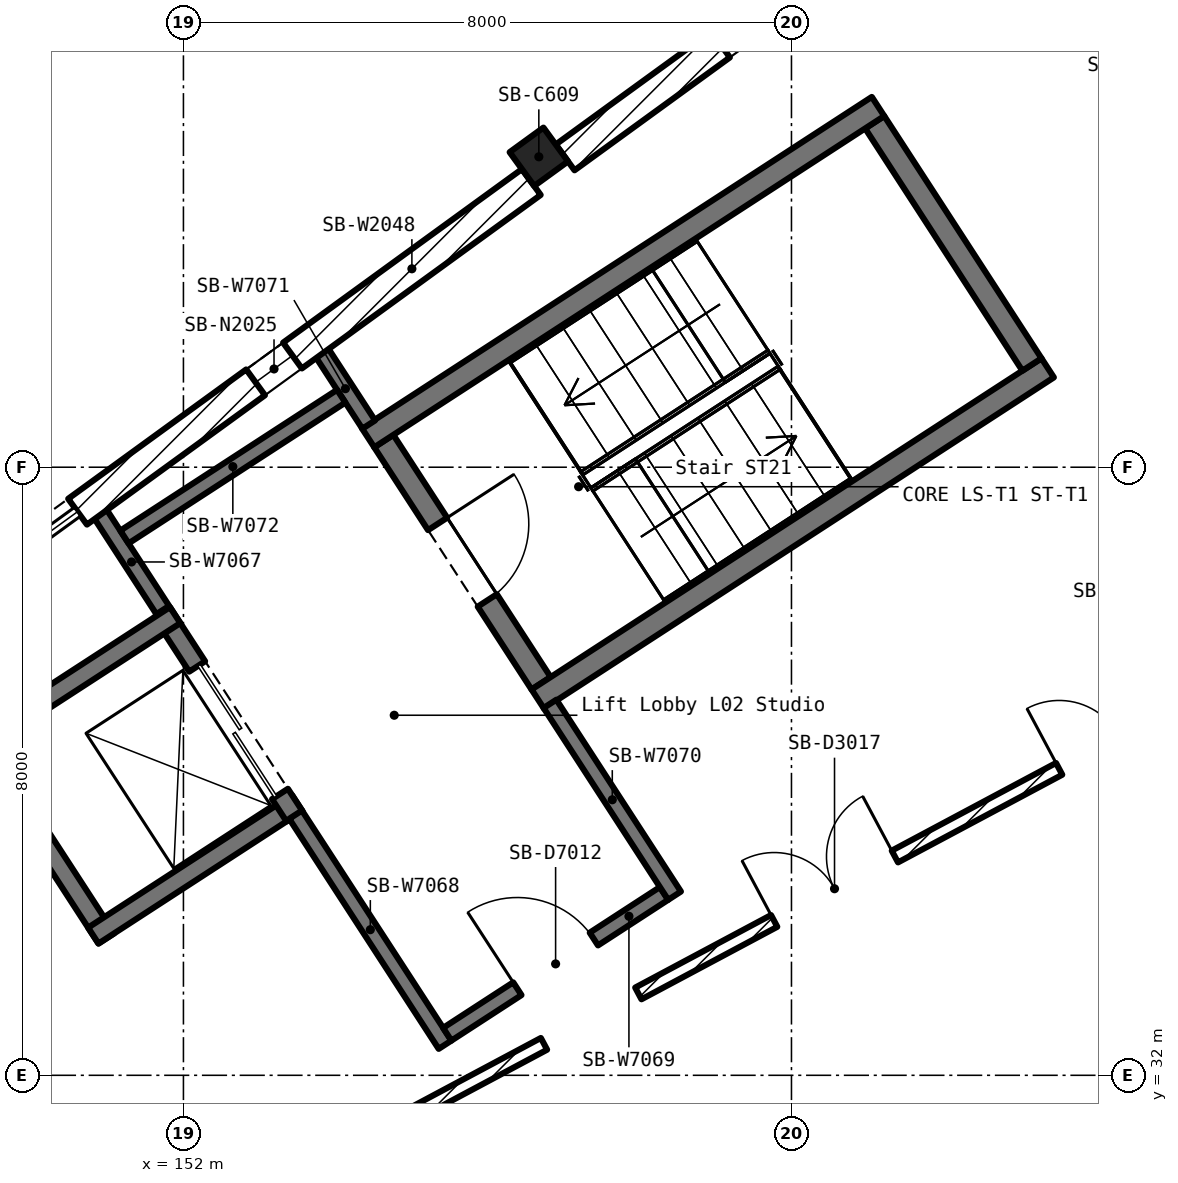
"""IFC4 building model, lengths in metres.
Left out: names, types, materials, properties, quantities, classifications, styles, units other than length and angle.
Written with IfcOpenShell. Run it as: python <this file> out.ifc"""

import sys

from ifc_helpers import new_model, si_unit, direction, frame, frame_2d, origin, origin_2d, place, context, subcontext, project, spatial, rectangle, extrude, element, fill, save


model = new_model("IFC4")
c1 = context("Model", 3, precision=1e-05, world=origin(), true_north=direction((0.0, 1.0)))
c2 = subcontext(c1, "Body", "Model", "MODEL_VIEW")
j1 = project(units=[si_unit("LENGTHUNIT", "METRE"), si_unit("PLANEANGLEUNIT", "RADIAN")], contexts=[c1])
p1 = place(None, origin())
s1 = spatial("IfcSite", under=j1, at=p1, CompositionType="ELEMENT")
p2 = place(p1, origin())
s2 = spatial("IfcBuilding", under=s1, at=p2, CompositionType="ELEMENT")
p3 = place(p2, frame((0.0, 0.0, 11.5)))
s3 = spatial("IfcBuildingStorey", under=s2, at=p3, CompositionType="ELEMENT", Elevation=11.5)
p4 = place(p3, frame((156.676, 44.084, 0.0), z_axis=(0.0, 0.0, 1.0), x_axis=(0.587785252292, -0.809016994375, 0.0)))
e1 = element("IfcColumn", 1, at=p4, inside=s3, PredefinedType="COLUMN", context=c2, shape_type="SweptSolid", body=[
    extrude(rectangle(XDim=0.55, YDim=0.55, at=origin_2d()), origin(), (0.0, 0.0, 1.0), 5.5),
])
p5 = place(p3, frame((149.708, 45.36, 0.0), z_axis=(0.0, 0.0, 1.0), x_axis=(0.766086094987, 0.642737967657, 0.0)))
e2 = element("IfcWall", 2, at=p5, inside=s3, PredefinedType="SOLIDWALL", context=c2, shape_type="SweptSolid", body=[
    extrude(rectangle(XDim=5.7, YDim=0.45, at=frame_2d((2.85, 0.0))), origin(), (0.0, 0.0, 1.0), 4.48),
])
p6 = place(p5, frame((1.85, 0.0, 1.0)))
e3 = element("IfcOpeningElement", 3, at=p6, cuts=e2, PredefinedType="OPENING", context=c2, shape_type="SweptSolid", body=[
    extrude(rectangle(XDim=2.0, YDim=2.8, at=frame_2d((1.0, 1.4))), frame((0.0, 0.237, 0.0), z_axis=(0.0, -1.0, 0.0), x_axis=(1.0, 0.0, 0.0)), (0.0, 0.0, 1.0), 0.474),
])
p7 = place(p3, frame((162.568, 48.105, 0.0), z_axis=(0.0, 0.0, 1.0), x_axis=(-0.809048605298, -0.587741741129, 0.0)))
e4 = element("IfcWall", 4, at=p7, inside=s3, PredefinedType="SOLIDWALL", context=c2, shape_type="SweptSolid", body=[
    extrude(rectangle(XDim=6.855, YDim=0.42, at=frame_2d((3.428, 0.0))), origin(), (0.0, 0.0, 1.0), 4.4),
])
p8 = place(p7, frame((2.528, 0.0, 1.0)))
e5 = element("IfcOpeningElement", 5, at=p8, cuts=e4, PredefinedType="OPENING", context=c2, shape_type="SweptSolid", body=[
    extrude(rectangle(XDim=1.8, YDim=1.5, at=frame_2d((0.9, 0.75))), frame((0.0, 0.222, 0.0), z_axis=(0.0, -1.0, 0.0), x_axis=(1.0, 0.0, 0.0)), (0.0, 0.0, 1.0), 0.444),
])
p9 = place(p3, frame((156.577, 43.752, 0.0), z_axis=(0.0, 0.0, 1.0), x_axis=(-0.809050732127, -0.587738813458, 0.0)))
e6 = element("IfcWall", 6, at=p9, inside=s3, PredefinedType="SOLIDWALL", context=c2, shape_type="SweptSolid", body=[
    extrude(rectangle(XDim=7.379, YDim=0.42, at=frame_2d((3.689, 0.0))), origin(), (0.0, 0.0, 1.0), 4.4),
])
p10 = place(p9, frame((3.884, 0.0, 1.0)))
e7 = element("IfcOpeningElement", 7, at=p10, cuts=e6, PredefinedType="OPENING", context=c2, shape_type="SweptSolid", body=[
    extrude(rectangle(XDim=0.6, YDim=1.5, at=frame_2d((0.3, 0.75))), frame((0.0, 0.222, 0.0), z_axis=(0.0, -1.0, 0.0), x_axis=(1.0, 0.0, 0.0)), (0.0, 0.0, 1.0), 0.444),
])
p11 = place(p3, frame((154.636, 40.344, 0.0), z_axis=(0.0, 0.0, 1.0), x_axis=(0.544712834543, -0.838622637355, 0.0)))
e8 = element("IfcWall", 8, at=p11, inside=s3, PredefinedType="SOLIDWALL", context=c2, shape_type="SweptSolid", body=[
    extrude(rectangle(XDim=3.8, YDim=0.3, at=frame_2d((1.9, 0.0))), origin(), (0.0, 0.0, 1.0), 5.5),
])
p12 = place(p11, frame((1.3, 0.0, 0.0)))
e9 = element("IfcOpeningElement", 9, at=p12, cuts=e8, PredefinedType="OPENING", context=c2, shape_type="SweptSolid", body=[
    extrude(rectangle(XDim=1.2, YDim=2.1, at=frame_2d((0.6, 1.05))), frame((0.0, 0.162, 0.0), z_axis=(0.0, -1.0, 0.0), x_axis=(1.0, 0.0, 0.0)), (0.0, 0.0, 1.0), 0.324),
])
p13 = place(p3, frame((156.662, 36.95, 0.0), z_axis=(0.0, 0.0, 1.0), x_axis=(0.838666673849, 0.544645031351, 0.0)))
e10 = element("IfcWall", 10, at=p13, inside=s3, PredefinedType="SOLIDWALL", context=c2, shape_type="SweptSolid", body=[
    extrude(rectangle(XDim=8.0, YDim=0.3, at=frame_2d((4.0, 0.0))), origin(), (0.0, 0.0, 1.0), 5.5),
])
p14 = place(p3, frame((163.164, 41.351, 0.0), z_axis=(0.0, 0.0, 1.0), x_axis=(-0.544414712312, 0.838816202167, 0.0)))
e11 = element("IfcWall", 11, at=p14, inside=s3, PredefinedType="SOLIDWALL", context=c2, shape_type="SweptSolid", body=[
    extrude(rectangle(XDim=3.801, YDim=0.3, at=frame_2d((1.9, 0.0))), origin(), (0.0, 0.0, 1.0), 5.5),
])
p15 = place(p3, frame((161.139, 44.746, 0.0), z_axis=(0.0, 0.0, 1.0), x_axis=(-0.838633189021, -0.544696589187, 0.0)))
e12 = element("IfcWall", 12, at=p15, inside=s3, PredefinedType="SOLIDWALL", context=c2, shape_type="SweptSolid", body=[
    extrude(rectangle(XDim=8.001, YDim=0.3, at=frame_2d((4.0, 0.0))), origin(), (0.0, 0.0, 1.0), 5.5),
])
p16 = place(p3, frame((143.871, 44.123, 0.0), z_axis=(0.0, 0.0, 1.0), x_axis=(0.7070945738, 0.707118988363, 0.0)))
e13 = element("IfcWall", 13, at=p16, inside=s3, PredefinedType="SOLIDWALL", context=c2, shape_type="SweptSolid", body=[
    extrude(rectangle(XDim=10.0, YDim=0.3, at=frame_2d((5.0, 0.0))), origin(), (0.0, 0.0, 1.0), 5.5),
])
for number, where, z_axis, x_axis in (
    (14, (149.244, 36.485, 0.0), (0.0, 0.0, 1.0), (0.545, -0.839, 0.0)),
    (15, (150.814, 33.838, 0.0), (0.0, 0.0, 1.0), (0.839, 0.545, 0.0)),
):
    element("IfcWall", number, at=place(p3, frame(where, z_axis=z_axis, x_axis=x_axis)), inside=s3, PredefinedType="SOLIDWALL", context=c2, shape_type="SweptSolid", body=[
        extrude(rectangle(XDim=3.2, YDim=0.25, at=frame_2d((1.6, 0.0))), origin(), (0.0, 0.0, 1.0), 5.5),
    ])
p17 = place(p3, frame((153.461, 35.408, 0.0), z_axis=(0.0, 0.0, 1.0), x_axis=(-0.544746938909, 0.838600484467, 0.0)))
e16 = element("IfcWall", 16, at=p17, inside=s3, PredefinedType="SOLIDWALL", context=c2, shape_type="SweptSolid", body=[
    extrude(rectangle(XDim=3.199, YDim=0.25, at=frame_2d((1.6, 0.0))), origin(), (0.0, 0.0, 1.0), 5.5),
])
p18 = place(p17, frame((0.35, 0.0, 0.0)))
e17 = element("IfcOpeningElement", 17, at=p18, cuts=e16, PredefinedType="OPENING", context=c2, shape_type="SweptSolid", body=[
    extrude(rectangle(XDim=2.0, YDim=2.2, at=frame_2d((1.0, 1.1))), frame((0.0, 0.137, 0.0), z_axis=(0.0, -1.0, 0.0), x_axis=(1.0, 0.0, 0.0)), (0.0, 0.0, 1.0), 0.274),
])
p19 = place(p3, frame((151.891, 38.054, 0.0), z_axis=(0.0, 0.0, 1.0), x_axis=(-0.838830397361, -0.544392840201, 0.0)))
e18 = element("IfcWall", 18, at=p19, inside=s3, PredefinedType="SOLIDWALL", context=c2, shape_type="SweptSolid", body=[
    extrude(rectangle(XDim=3.2, YDim=0.25, at=frame_2d((1.6, 0.0))), origin(), (0.0, 0.0, 1.0), 5.5),
])
p20 = place(p3, frame((150.907, 39.386, 0.0), z_axis=(0.0, 0.0, 1.0), x_axis=(0.54445901867, -0.838787444463, 0.0)))
e19 = element("IfcWall", 19, at=p20, inside=s3, PredefinedType="PARTITIONING", context=c2, shape_type="SweptSolid", body=[
    extrude(rectangle(XDim=1.508, YDim=0.2, at=frame_2d((0.754, 0.0))), origin(), (0.0, 0.0, 1.0), 5.28),
])
p21 = place(p3, frame((153.476, 35.429, 0.0), z_axis=(0.0, 0.0, 1.0), x_axis=(0.544669706692, -0.838650648728, 0.0)))
e20 = element("IfcWall", 20, at=p21, inside=s3, PredefinedType="PARTITIONING", context=c2, shape_type="SweptSolid", body=[
    extrude(rectangle(XDim=3.609, YDim=0.2, at=frame_2d((1.805, 0.0))), origin(), (0.0, 0.0, 1.0), 5.28),
])
p22 = place(p3, frame((155.471, 32.54, 0.0), z_axis=(0.0, 0.0, 1.0), x_axis=(0.838683012783, 0.544619871167, 0.0)))
e21 = element("IfcWall", 21, at=p22, inside=s3, PredefinedType="PARTITIONING", context=c2, shape_type="SweptSolid", body=[
    extrude(rectangle(XDim=3.401, YDim=0.2, at=frame_2d((1.7, 0.0))), origin(), (0.0, 0.0, 1.0), 5.28),
])
p23 = place(p22, frame((1.1, 0.0, 0.0)))
e22 = element("IfcOpeningElement", 22, at=p23, cuts=e21, PredefinedType="OPENING", context=c2, shape_type="SweptSolid", body=[
    extrude(rectangle(XDim=1.2, YDim=2.1, at=frame_2d((0.6, 1.05))), frame((0.0, 0.112, 0.0), z_axis=(0.0, -1.0, 0.0), x_axis=(1.0, 0.0, 0.0)), (0.0, 0.0, 1.0), 0.224),
])
p24 = place(p3, frame((158.462, 34.363, 0.0), z_axis=(0.0, 0.0, 1.0), x_axis=(-0.544606183959, 0.838691900756, 0.0)))
e23 = element("IfcWall", 23, at=p24, inside=s3, PredefinedType="PARTITIONING", context=c2, shape_type="SweptSolid", body=[
    extrude(rectangle(XDim=3.009, YDim=0.2, at=frame_2d((1.505, 0.0))), origin(), (0.0, 0.0, 1.0), 5.28),
])
p25 = place(p3, frame((154.438, 40.561, 0.0), z_axis=(0.0, 0.0, 1.0), x_axis=(-0.545308400226, 0.838235497127, 0.0)))
e24 = element("IfcWall", 24, at=p25, inside=s3, PredefinedType="PARTITIONING", context=c2, shape_type="SweptSolid", body=[
    extrude(rectangle(XDim=1.126, YDim=0.2, at=frame_2d((0.563, 0.0))), origin(), (0.0, 0.0, 1.0), 5.28),
])
p26 = place(p3, frame((154.076, 40.934, 0.0), z_axis=(0.0, 0.0, 1.0), x_axis=(-0.838661716351, -0.544652665032, 0.0)))
e25 = element("IfcWall", 25, at=p26, inside=s3, PredefinedType="PARTITIONING", context=c2, shape_type="SweptSolid", body=[
    extrude(rectangle(XDim=3.4, YDim=0.2, at=frame_2d((1.7, 0.0))), origin(), (0.0, 0.0, 1.0), 5.28),
])
p27 = place(p3, frame((157.985, 33.077, 0.0), z_axis=(0.0, 0.0, 1.0), x_axis=(0.882245671987, 0.470789309841, 0.0)))
e26 = element("IfcWall", 26, at=p27, inside=s3, PredefinedType="PARTITIONING", context=c2, shape_type="SweptSolid", body=[
    extrude(rectangle(XDim=16.825, YDim=0.175, at=frame_2d((8.413, 0.0))), origin(), (0.0, 0.0, 1.0), 4.3),
])
p28 = place(p27, frame((2.026, 0.0, 0.0)))
e27 = element("IfcOpeningElement", 27, at=p28, cuts=e26, PredefinedType="OPENING", context=c2, shape_type="SweptSolid", body=[
    extrude(rectangle(XDim=1.8, YDim=2.1, at=frame_2d((0.9, 1.05))), frame((0.0, 0.1, 0.0), z_axis=(0.0, -1.0, 0.0), x_axis=(1.0, 0.0, 0.0)), (0.0, 0.0, 1.0), 0.199),
])
p29 = place(p27, frame((6.276, 0.0, 0.0)))
e28 = element("IfcOpeningElement", 28, at=p29, cuts=e26, PredefinedType="OPENING", context=c2, shape_type="SweptSolid", body=[
    extrude(rectangle(XDim=1.8, YDim=2.1, at=frame_2d((0.9, 1.05))), frame((0.0, 0.1, 0.0), z_axis=(0.0, -1.0, 0.0), x_axis=(1.0, 0.0, 0.0)), (0.0, 0.0, 1.0), 0.199),
])
p30 = place(p3, frame((149.619, 28.612, 0.0), z_axis=(0.0, 0.0, 1.0), x_axis=(0.882249989565, 0.470781218733, 0.0)))
e29 = element("IfcWall", 29, at=p30, inside=s3, PredefinedType="PARTITIONING", context=c2, shape_type="SweptSolid", body=[
    extrude(rectangle(XDim=8.076, YDim=0.175, at=frame_2d((4.038, 0.0))), origin(), (0.0, 0.0, 1.0), 4.3),
])
p31 = place(p3, frame((175.69, 34.756, 0.0), z_axis=(0.0, 0.0, 1.0), x_axis=(-0.916618872493, -0.39976223257, 0.0)))
e30 = element("IfcWall", 30, at=p31, inside=s3, PredefinedType="PARTITIONING", context=c2, shape_type="SweptSolid", body=[
    extrude(rectangle(XDim=28.65, YDim=0.175, at=frame_2d((14.325, 0.0))), origin(), (0.0, 0.0, 1.0), 4.3),
])
p32 = place(p31, frame((13.24, 0.0, 0.0)))
e31 = element("IfcOpeningElement", 31, at=p32, cuts=e30, PredefinedType="OPENING", context=c2, shape_type="SweptSolid", body=[
    extrude(rectangle(XDim=1.8, YDim=2.1, at=frame_2d((0.9, 1.05))), frame((0.0, 0.1, 0.0), z_axis=(0.0, -1.0, 0.0), x_axis=(1.0, 0.0, 0.0)), (0.0, 0.0, 1.0), 0.199),
])
p33 = place(p31, frame((9.24, 0.0, 0.0)))
e32 = element("IfcOpeningElement", 32, at=p33, cuts=e30, PredefinedType="OPENING", context=c2, shape_type="SweptSolid", body=[
    extrude(rectangle(XDim=1.8, YDim=2.1, at=frame_2d((0.9, 1.05))), frame((0.0, 0.1, 0.0), z_axis=(0.0, -1.0, 0.0), x_axis=(1.0, 0.0, 0.0)), (0.0, 0.0, 1.0), 0.199),
])
p34 = place(p12, origin())
e33 = element("IfcDoor", 33, at=p34, inside=s3, OperationType="SINGLE_SWING_LEFT", PredefinedType="DOOR", context=c2, shape_type="SweptSolid", body=[
    extrude(rectangle(XDim=1.2, YDim=2.1, at=frame_2d((0.6, 1.05))), frame((0.0, 0.025, 0.0), z_axis=(0.0, -1.0, 0.0), x_axis=(1.0, 0.0, 0.0)), (0.0, 0.0, 1.0), 0.05),
])
fill(e9, e33)
p35 = place(p18, origin())
e34 = element("IfcDoor", 34, at=p35, inside=s3, OperationType="DOUBLE_DOOR_SLIDING", PredefinedType="DOOR", context=c2, shape_type="SweptSolid", body=[
    extrude(rectangle(XDim=2.0, YDim=2.2, at=frame_2d((1.0, 1.1))), frame((0.0, 0.025, 0.0), z_axis=(0.0, -1.0, 0.0), x_axis=(1.0, 0.0, 0.0)), (0.0, 0.0, 1.0), 0.05),
])
fill(e17, e34)
p36 = place(p23, origin())
e35 = element("IfcDoor", 35, at=p36, inside=s3, OperationType="SINGLE_SWING_LEFT", PredefinedType="DOOR", context=c2, shape_type="SweptSolid", body=[
    extrude(rectangle(XDim=1.2, YDim=2.1, at=frame_2d((0.6, 1.05))), frame((0.0, 0.025, 0.0), z_axis=(0.0, -1.0, 0.0), x_axis=(1.0, 0.0, 0.0)), (0.0, 0.0, 1.0), 0.05),
])
fill(e22, e35)
p37 = place(p28, origin())
e36 = element("IfcDoor", 36, at=p37, inside=s3, OperationType="DOUBLE_DOOR_SINGLE_SWING", PredefinedType="DOOR", context=c2, shape_type="SweptSolid", body=[
    extrude(rectangle(XDim=1.8, YDim=2.1, at=frame_2d((0.9, 1.05))), frame((0.0, 0.025, 0.0), z_axis=(0.0, -1.0, 0.0), x_axis=(1.0, 0.0, 0.0)), (0.0, 0.0, 1.0), 0.05),
])
fill(e27, e36)
p38 = place(p29, origin())
e37 = element("IfcDoor", 37, at=p38, inside=s3, OperationType="DOUBLE_DOOR_SINGLE_SWING", PredefinedType="DOOR", context=c2, shape_type="SweptSolid", body=[
    extrude(rectangle(XDim=1.8, YDim=2.1, at=frame_2d((0.9, 1.05))), frame((0.0, 0.025, 0.0), z_axis=(0.0, -1.0, 0.0), x_axis=(1.0, 0.0, 0.0)), (0.0, 0.0, 1.0), 0.05),
])
fill(e28, e37)
p39 = place(p10, origin())
e38 = element("IfcWindow", 38, at=p39, inside=s3, PartitioningType="SINGLE_PANEL", PredefinedType="WINDOW", context=c2, shape_type="SweptSolid", body=[
    extrude(rectangle(XDim=0.6, YDim=1.5, at=frame_2d((0.3, 0.75))), frame((0.0, 0.03, 0.0), z_axis=(0.0, -1.0, 0.0), x_axis=(1.0, 0.0, 0.0)), (0.0, 0.0, 1.0), 0.06),
])
fill(e7, e38)
save(model, sys.argv[1])
